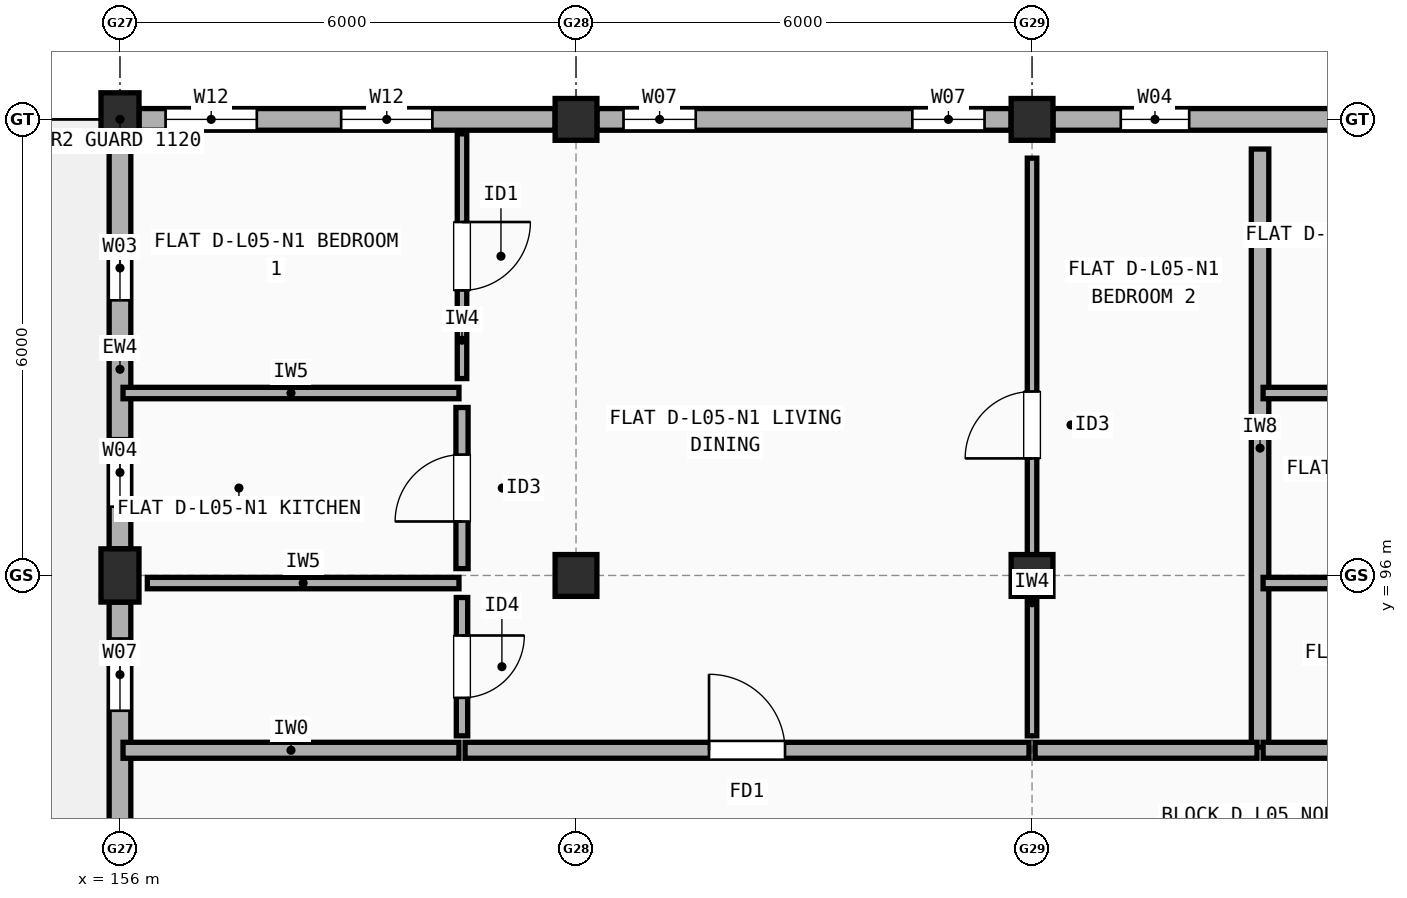
"""IFC4 building model, lengths in metres.
Left out: names, types, materials, properties, quantities, classifications, styles, units other than length and angle.
Written with IfcOpenShell. Run it as: python <this file> out.ifc"""

import sys

from ifc_helpers import new_model, si_unit, direction, frame, frame_2d, origin, origin_2d, place, context, subcontext, project, spatial, rectangle, extrude, element, fill, save


model = new_model("IFC4")
c1 = context("Model", 3, precision=1e-05, world=origin(), true_north=direction((0.0, 1.0)))
c2 = subcontext(c1, "Body", "Model", "MODEL_VIEW")
j1 = project(units=[si_unit("LENGTHUNIT", "METRE"), si_unit("PLANEANGLEUNIT", "RADIAN")], contexts=[c1])
p1 = place(None, origin())
s1 = spatial("IfcSite", under=j1, at=p1, CompositionType="ELEMENT")
p2 = place(p1, origin())
s2 = spatial("IfcBuilding", under=s1, at=p2, CompositionType="ELEMENT")
p3 = place(p2, frame((0.0, 0.0, 17.3)))
s3 = spatial("IfcBuildingStorey", under=s2, at=p3, CompositionType="ELEMENT", Elevation=17.3)
for number, where, z_axis, x_axis in (
    (1, (156.0, 96.0, 0.0), (0.0, 0.0, 1.0), (1.0, 0.0, 0.0)),
    (2, (156.0, 102.0, 0.0), (0.0, 0.0, 1.0), (1.0, 0.0, 0.0)),
):
    element("IfcColumn", number, at=place(p3, frame(where, z_axis=z_axis, x_axis=x_axis)), inside=s3, PredefinedType="COLUMN", context=c2, shape_type="SweptSolid", body=[
        extrude(rectangle(XDim=0.5, YDim=0.7, at=origin_2d()), origin(), (0.0, 0.0, 1.0), 2.965),
    ])
for number, where, z_axis, x_axis in (
    (3, (162.0, 96.0, 0.0), (0.0, 0.0, 1.0), (1.0, 0.0, 0.0)),
    (4, (162.0, 102.0, 0.0), (0.0, 0.0, 1.0), (1.0, 0.0, 0.0)),
    (5, (168.0, 96.0, 0.0), (0.0, 0.0, 1.0), (1.0, 0.0, 0.0)),
    (6, (168.0, 102.0, 0.0), (0.0, 0.0, 1.0), (1.0, 0.0, 0.0)),
):
    element("IfcColumn", number, at=place(p3, frame(where, z_axis=z_axis, x_axis=x_axis)), inside=s3, PredefinedType="COLUMN", context=c2, shape_type="SweptSolid", body=[
        extrude(rectangle(XDim=0.55, YDim=0.55, at=origin_2d()), origin(), (0.0, 0.0, 1.0), 2.965),
    ])
p4 = place(p3, frame((173.725, 102.0, 0.0), z_axis=(0.0, 0.0, 1.0), x_axis=(-1.0, 0.0, 0.0)))
e7 = element("IfcWall", 7, at=p4, inside=s3, PredefinedType="STANDARD", context=c2, shape_type="SweptSolid", body=[
    extrude(rectangle(XDim=5.45, YDim=0.285, at=frame_2d((2.725, 0.0))), origin(), (0.0, 0.0, 1.0), 2.447),
])
p5 = place(p4, frame((0.917, 0.0, 0.9)))
e8 = element("IfcOpeningElement", 8, at=p5, cuts=e7, PredefinedType="OPENING", context=c2, shape_type="SweptSolid", body=[
    extrude(rectangle(XDim=0.85, YDim=1.25, at=frame_2d((0.425, 0.625))), frame((0.0, 0.152, 0.0), z_axis=(0.0, -1.0, 0.0), x_axis=(1.0, 0.0, 0.0)), (0.0, 0.0, 1.0), 0.305),
])
p6 = place(p4, frame((3.657, 0.0, 0.9)))
e9 = element("IfcOpeningElement", 9, at=p6, cuts=e7, PredefinedType="OPENING", context=c2, shape_type="SweptSolid", body=[
    extrude(rectangle(XDim=0.9, YDim=1.3, at=frame_2d((0.45, 0.65))), frame((0.0, 0.152, 0.0), z_axis=(0.0, -1.0, 0.0), x_axis=(1.0, 0.0, 0.0)), (0.0, 0.0, 1.0), 0.305),
])
p7 = place(p3, frame((167.725, 102.0, 0.0), z_axis=(0.0, 0.0, 1.0), x_axis=(-1.0, 0.0, 0.0)))
e10 = element("IfcWall", 10, at=p7, inside=s3, PredefinedType="STANDARD", context=c2, shape_type="SweptSolid", body=[
    extrude(rectangle(XDim=5.45, YDim=0.285, at=frame_2d((2.725, 0.0))), origin(), (0.0, 0.0, 1.0), 2.447),
])
p8 = place(p7, frame((0.35, 0.0, 0.9)))
e11 = element("IfcOpeningElement", 11, at=p8, cuts=e10, PredefinedType="OPENING", context=c2, shape_type="SweptSolid", body=[
    extrude(rectangle(XDim=0.95, YDim=1.35, at=frame_2d((0.475, 0.675))), frame((0.0, 0.152, 0.0), z_axis=(0.0, -1.0, 0.0), x_axis=(1.0, 0.0, 0.0)), (0.0, 0.0, 1.0), 0.305),
])
p9 = place(p7, frame((4.15, 0.0, 0.9)))
e12 = element("IfcOpeningElement", 12, at=p9, cuts=e10, PredefinedType="OPENING", context=c2, shape_type="SweptSolid", body=[
    extrude(rectangle(XDim=0.95, YDim=1.35, at=frame_2d((0.475, 0.675))), frame((0.0, 0.152, 0.0), z_axis=(0.0, -1.0, 0.0), x_axis=(1.0, 0.0, 0.0)), (0.0, 0.0, 1.0), 0.305),
])
p10 = place(p3, frame((161.725, 102.0, 0.0), z_axis=(0.0, 0.0, 1.0), x_axis=(-1.0, 0.0, 0.0)))
e13 = element("IfcWall", 13, at=p10, inside=s3, PredefinedType="STANDARD", context=c2, shape_type="SweptSolid", body=[
    extrude(rectangle(XDim=5.475, YDim=0.285, at=frame_2d((2.738, 0.0))), origin(), (0.0, 0.0, 1.0), 2.447),
])
p11 = place(p10, frame((1.615, 0.0, 0.9)))
e14 = element("IfcOpeningElement", 14, at=p11, cuts=e13, PredefinedType="OPENING", context=c2, shape_type="SweptSolid", body=[
    extrude(rectangle(XDim=1.2, YDim=1.35, at=frame_2d((0.6, 0.675))), frame((0.0, 0.152, 0.0), z_axis=(0.0, -1.0, 0.0), x_axis=(1.0, 0.0, 0.0)), (0.0, 0.0, 1.0), 0.305),
])
p12 = place(p10, frame((3.925, 0.0, 0.9)))
e15 = element("IfcOpeningElement", 15, at=p12, cuts=e13, PredefinedType="OPENING", context=c2, shape_type="SweptSolid", body=[
    extrude(rectangle(XDim=1.2, YDim=1.35, at=frame_2d((0.6, 0.675))), frame((0.0, 0.152, 0.0), z_axis=(0.0, -1.0, 0.0), x_axis=(1.0, 0.0, 0.0)), (0.0, 0.0, 1.0), 0.305),
])
p13 = place(p3, frame((156.0, 101.65, 0.0), z_axis=(0.0, 0.0, 1.0), x_axis=(0.0, -1.0, 0.0)))
e16 = element("IfcWall", 16, at=p13, inside=s3, PredefinedType="STANDARD", context=c2, shape_type="SweptSolid", body=[
    extrude(rectangle(XDim=5.3, YDim=0.285, at=frame_2d((2.65, 0.0))), origin(), (0.0, 0.0, 1.0), 2.447),
])
p14 = place(p13, frame((1.18, 0.0, 0.9)))
e17 = element("IfcOpeningElement", 17, at=p14, cuts=e16, PredefinedType="OPENING", context=c2, shape_type="SweptSolid", body=[
    extrude(rectangle(XDim=0.85, YDim=1.25, at=frame_2d((0.425, 0.625))), frame((0.0, 0.152, 0.0), z_axis=(0.0, -1.0, 0.0), x_axis=(1.0, 0.0, 0.0)), (0.0, 0.0, 1.0), 0.305),
])
p15 = place(p13, frame((3.845, 0.0, 0.9)))
e18 = element("IfcOpeningElement", 18, at=p15, cuts=e16, PredefinedType="OPENING", context=c2, shape_type="SweptSolid", body=[
    extrude(rectangle(XDim=0.9, YDim=1.3, at=frame_2d((0.45, 0.65))), frame((0.0, 0.152, 0.0), z_axis=(0.0, -1.0, 0.0), x_axis=(1.0, 0.0, 0.0)), (0.0, 0.0, 1.0), 0.305),
])
p16 = place(p3, frame((156.0, 95.65, 0.0), z_axis=(0.0, 0.0, 1.0), x_axis=(0.0, -1.0, 0.0)))
e19 = element("IfcWall", 19, at=p16, inside=s3, PredefinedType="STANDARD", context=c2, shape_type="SweptSolid", body=[
    extrude(rectangle(XDim=5.3, YDim=0.285, at=frame_2d((2.65, 0.0))), origin(), (0.0, 0.0, 1.0), 2.447),
])
p17 = place(p16, frame((0.48, 0.0, 0.9)))
e20 = element("IfcOpeningElement", 20, at=p17, cuts=e19, PredefinedType="OPENING", context=c2, shape_type="SweptSolid", body=[
    extrude(rectangle(XDim=0.95, YDim=1.35, at=frame_2d((0.475, 0.675))), frame((0.0, 0.152, 0.0), z_axis=(0.0, -1.0, 0.0), x_axis=(1.0, 0.0, 0.0)), (0.0, 0.0, 1.0), 0.305),
])
p18 = place(p16, frame((3.12, 0.0, 0.9)))
e21 = element("IfcOpeningElement", 21, at=p18, cuts=e19, PredefinedType="OPENING", context=c2, shape_type="SweptSolid", body=[
    extrude(rectangle(XDim=1.05, YDim=1.35, at=frame_2d((0.525, 0.675))), frame((0.0, 0.152, 0.0), z_axis=(0.0, -1.0, 0.0), x_axis=(1.0, 0.0, 0.0)), (0.0, 0.0, 1.0), 0.305),
])
p19 = place(p3, frame((171.0, 93.74, 0.0), z_axis=(0.0, 0.0, 1.0), x_axis=(0.0, 1.0, 0.0)))
e22 = element("IfcWall", 22, at=p19, inside=s3, PredefinedType="SOLIDWALL", context=c2, shape_type="SweptSolid", body=[
    extrude(rectangle(XDim=7.87, YDim=0.23, at=frame_2d((3.935, 0.0))), origin(), (0.0, 0.0, 1.0), 2.508),
])
p20 = place(p3, frame((156.04, 93.7, 0.0), z_axis=(0.0, 0.0, 1.0), x_axis=(1.0, 0.0, 0.0)))
e23 = element("IfcWall", 23, at=p20, inside=s3, PredefinedType="SOLIDWALL", context=c2, shape_type="SweptSolid", body=[
    extrude(rectangle(XDim=4.42, YDim=0.21, at=frame_2d((2.21, 0.0))), origin(), (0.0, 0.0, 1.0), 2.447),
])
p21 = place(p3, frame((160.54, 93.7, 0.0), z_axis=(0.0, 0.0, 1.0), x_axis=(1.0, 0.0, 0.0)))
e24 = element("IfcWall", 24, at=p21, inside=s3, PredefinedType="SOLIDWALL", context=c2, shape_type="SweptSolid", body=[
    extrude(rectangle(XDim=7.42, YDim=0.21, at=frame_2d((3.71, 0.0))), origin(), (0.0, 0.0, 1.0), 2.508),
])
p22 = place(p21, frame((3.21, 0.0, 0.0)))
e25 = element("IfcOpeningElement", 25, at=p22, cuts=e24, PredefinedType="OPENING", context=c2, shape_type="SweptSolid", body=[
    extrude(rectangle(XDim=1.0, YDim=2.15, at=frame_2d((0.5, 1.075))), frame((0.0, 0.115, 0.0), z_axis=(0.0, -1.0, 0.0), x_axis=(1.0, 0.0, 0.0)), (0.0, 0.0, 1.0), 0.23),
])
p23 = place(p3, frame((160.5, 98.59, 0.0), z_axis=(0.0, 0.0, 1.0), x_axis=(0.0, 1.0, 0.0)))
e26 = element("IfcWall", 26, at=p23, inside=s3, PredefinedType="PARTITIONING", context=c2, shape_type="SweptSolid", body=[
    extrude(rectangle(XDim=3.22, YDim=0.125, at=frame_2d((1.61, 0.0))), origin(), (0.0, 0.0, 1.0), 2.965),
])
p24 = place(p23, frame((1.16, 0.0, 0.0)))
e27 = element("IfcOpeningElement", 27, at=p24, cuts=e26, PredefinedType="OPENING", context=c2, shape_type="SweptSolid", body=[
    extrude(rectangle(XDim=0.9, YDim=2.1, at=frame_2d((0.45, 1.05))), frame((0.0, 0.073, 0.0), z_axis=(0.0, -1.0, 0.0), x_axis=(1.0, 0.0, 0.0)), (0.0, 0.0, 1.0), 0.145),
])
p25 = place(p3, frame((160.5, 96.09, 0.0), z_axis=(0.0, 0.0, 1.0), x_axis=(0.0, 1.0, 0.0)))
e28 = element("IfcWall", 28, at=p25, inside=s3, PredefinedType="PLUMBINGWALL", context=c2, shape_type="SweptSolid", body=[
    extrude(rectangle(XDim=2.12, YDim=0.16, at=frame_2d((1.06, 0.0))), origin(), (0.0, 0.0, 1.0), 2.408),
])
p26 = place(p25, frame((0.62, 0.0, 0.0)))
e29 = element("IfcOpeningElement", 29, at=p26, cuts=e28, PredefinedType="OPENING", context=c2, shape_type="SweptSolid", body=[
    extrude(rectangle(XDim=0.88, YDim=2.1, at=frame_2d((0.44, 1.05))), frame((0.0, 0.09, 0.0), z_axis=(0.0, -1.0, 0.0), x_axis=(1.0, 0.0, 0.0)), (0.0, 0.0, 1.0), 0.18),
])
p27 = place(p3, frame((160.5, 93.89, 0.0), z_axis=(0.0, 0.0, 1.0), x_axis=(0.0, 1.0, 0.0)))
e30 = element("IfcWall", 30, at=p27, inside=s3, PredefinedType="PARTITIONING", context=c2, shape_type="SweptSolid", body=[
    extrude(rectangle(XDim=1.82, YDim=0.15, at=frame_2d((0.91, 0.0))), origin(), (0.0, 0.0, 1.0), 2.965),
])
p28 = place(p27, frame((0.5, 0.0, 0.0)))
e31 = element("IfcOpeningElement", 31, at=p28, cuts=e30, PredefinedType="OPENING", context=c2, shape_type="SweptSolid", body=[
    extrude(rectangle(XDim=0.82, YDim=2.08, at=frame_2d((0.41, 1.04))), frame((0.0, 0.085, 0.0), z_axis=(0.0, -1.0, 0.0), x_axis=(1.0, 0.0, 0.0)), (0.0, 0.0, 1.0), 0.17),
])
p29 = place(p3, frame((156.04, 98.4, 0.0), z_axis=(0.0, 0.0, 1.0), x_axis=(1.0, 0.0, 0.0)))
e32 = element("IfcWall", 32, at=p29, inside=s3, PredefinedType="PARTITIONING", context=c2, shape_type="SweptSolid", body=[
    extrude(rectangle(XDim=4.42, YDim=0.15, at=frame_2d((2.21, 0.0))), origin(), (0.0, 0.0, 1.0), 2.447),
])
p30 = place(p3, frame((156.36, 95.9, 0.0), z_axis=(0.0, 0.0, 1.0), x_axis=(1.0, 0.0, 0.0)))
e33 = element("IfcWall", 33, at=p30, inside=s3, PredefinedType="PARTITIONING", context=c2, shape_type="SweptSolid", body=[
    extrude(rectangle(XDim=4.1, YDim=0.15, at=frame_2d((2.05, 0.0))), origin(), (0.0, 0.0, 1.0), 2.408),
])
p31 = place(p3, frame((168.04, 93.7, 0.0), z_axis=(0.0, 0.0, 1.0), x_axis=(1.0, 0.0, 0.0)))
e34 = element("IfcWall", 34, at=p31, inside=s3, PredefinedType="SOLIDWALL", context=c2, shape_type="SweptSolid", body=[
    extrude(rectangle(XDim=2.92, YDim=0.21, at=frame_2d((1.46, 0.0))), origin(), (0.0, 0.0, 1.0), 2.508),
])
p32 = place(p3, frame((168.0, 93.89, 0.0), z_axis=(0.0, 0.0, 1.0), x_axis=(0.0, 1.0, 0.0)))
e35 = element("IfcWall", 35, at=p32, inside=s3, PredefinedType="PARTITIONING", context=c2, shape_type="SweptSolid", body=[
    extrude(rectangle(XDim=7.6, YDim=0.125, at=frame_2d((3.8, 0.0))), origin(), (0.0, 0.0, 1.0), 2.458),
])
p33 = place(p32, frame((3.65, 0.0, 0.0)))
e36 = element("IfcOpeningElement", 36, at=p33, cuts=e35, PredefinedType="OPENING", context=c2, shape_type="SweptSolid", body=[
    extrude(rectangle(XDim=0.88, YDim=2.1, at=frame_2d((0.44, 1.05))), frame((0.0, 0.073, 0.0), z_axis=(0.0, -1.0, 0.0), x_axis=(1.0, 0.0, 0.0)), (0.0, 0.0, 1.0), 0.145),
])
p34 = place(p3, frame((171.04, 93.7, 0.0), z_axis=(0.0, 0.0, 1.0), x_axis=(1.0, 0.0, 0.0)))
e37 = element("IfcWall", 37, at=p34, inside=s3, PredefinedType="SOLIDWALL", context=c2, shape_type="SweptSolid", body=[
    extrude(rectangle(XDim=4.42, YDim=0.21, at=frame_2d((2.21, 0.0))), origin(), (0.0, 0.0, 1.0), 2.965),
])
p35 = place(p3, frame((171.04, 98.4, 0.0), z_axis=(0.0, 0.0, 1.0), x_axis=(1.0, 0.0, 0.0)))
e38 = element("IfcWall", 38, at=p35, inside=s3, PredefinedType="PARTITIONING", context=c2, shape_type="SweptSolid", body=[
    extrude(rectangle(XDim=4.42, YDim=0.15, at=frame_2d((2.21, 0.0))), origin(), (0.0, 0.0, 1.0), 2.458),
])
p36 = place(p3, frame((171.04, 95.9, 0.0), z_axis=(0.0, 0.0, 1.0), x_axis=(1.0, 0.0, 0.0)))
e39 = element("IfcWall", 39, at=p36, inside=s3, PredefinedType="PARTITIONING", context=c2, shape_type="SweptSolid", body=[
    extrude(rectangle(XDim=4.42, YDim=0.15, at=frame_2d((2.21, 0.0))), origin(), (0.0, 0.0, 1.0), 2.408),
])
p37 = place(p6, origin())
e40 = element("IfcWindow", 40, at=p37, inside=s3, PartitioningType="SINGLE_PANEL", PredefinedType="WINDOW", context=c2, shape_type="SweptSolid", body=[
    extrude(rectangle(XDim=0.9, YDim=1.3, at=frame_2d((0.45, 0.65))), frame((0.0, 0.03, 0.0), z_axis=(0.0, -1.0, 0.0), x_axis=(1.0, 0.0, 0.0)), (0.0, 0.0, 1.0), 0.06),
])
fill(e9, e40)
p38 = place(p8, origin())
e41 = element("IfcWindow", 41, at=p38, inside=s3, PartitioningType="SINGLE_PANEL", PredefinedType="WINDOW", context=c2, shape_type="SweptSolid", body=[
    extrude(rectangle(XDim=0.95, YDim=1.35, at=frame_2d((0.475, 0.675))), frame((0.0, 0.03, 0.0), z_axis=(0.0, -1.0, 0.0), x_axis=(1.0, 0.0, 0.0)), (0.0, 0.0, 1.0), 0.06),
])
fill(e11, e41)
p39 = place(p9, origin())
e42 = element("IfcWindow", 42, at=p39, inside=s3, PartitioningType="SINGLE_PANEL", PredefinedType="WINDOW", context=c2, shape_type="SweptSolid", body=[
    extrude(rectangle(XDim=0.95, YDim=1.35, at=frame_2d((0.475, 0.675))), frame((0.0, 0.03, 0.0), z_axis=(0.0, -1.0, 0.0), x_axis=(1.0, 0.0, 0.0)), (0.0, 0.0, 1.0), 0.06),
])
fill(e12, e42)
p40 = place(p11, origin())
e43 = element("IfcWindow", 43, at=p40, inside=s3, PartitioningType="SINGLE_PANEL", PredefinedType="WINDOW", context=c2, shape_type="SweptSolid", body=[
    extrude(rectangle(XDim=1.2, YDim=1.35, at=frame_2d((0.6, 0.675))), frame((0.0, 0.03, 0.0), z_axis=(0.0, -1.0, 0.0), x_axis=(1.0, 0.0, 0.0)), (0.0, 0.0, 1.0), 0.06),
])
fill(e14, e43)
p41 = place(p12, origin())
e44 = element("IfcWindow", 44, at=p41, inside=s3, PartitioningType="SINGLE_PANEL", PredefinedType="WINDOW", context=c2, shape_type="SweptSolid", body=[
    extrude(rectangle(XDim=1.2, YDim=1.35, at=frame_2d((0.6, 0.675))), frame((0.0, 0.03, 0.0), z_axis=(0.0, -1.0, 0.0), x_axis=(1.0, 0.0, 0.0)), (0.0, 0.0, 1.0), 0.06),
])
fill(e15, e44)
p42 = place(p14, origin())
e45 = element("IfcWindow", 45, at=p42, inside=s3, PartitioningType="SINGLE_PANEL", PredefinedType="WINDOW", context=c2, shape_type="SweptSolid", body=[
    extrude(rectangle(XDim=0.85, YDim=1.25, at=frame_2d((0.425, 0.625))), frame((0.0, 0.03, 0.0), z_axis=(0.0, -1.0, 0.0), x_axis=(1.0, 0.0, 0.0)), (0.0, 0.0, 1.0), 0.06),
])
fill(e17, e45)
p43 = place(p15, origin())
e46 = element("IfcWindow", 46, at=p43, inside=s3, PartitioningType="SINGLE_PANEL", PredefinedType="WINDOW", context=c2, shape_type="SweptSolid", body=[
    extrude(rectangle(XDim=0.9, YDim=1.3, at=frame_2d((0.45, 0.65))), frame((0.0, 0.03, 0.0), z_axis=(0.0, -1.0, 0.0), x_axis=(1.0, 0.0, 0.0)), (0.0, 0.0, 1.0), 0.06),
])
fill(e18, e46)
p44 = place(p17, origin())
e47 = element("IfcWindow", 47, at=p44, inside=s3, PartitioningType="SINGLE_PANEL", PredefinedType="WINDOW", context=c2, shape_type="SweptSolid", body=[
    extrude(rectangle(XDim=0.95, YDim=1.35, at=frame_2d((0.475, 0.675))), frame((0.0, 0.03, 0.0), z_axis=(0.0, -1.0, 0.0), x_axis=(1.0, 0.0, 0.0)), (0.0, 0.0, 1.0), 0.06),
])
fill(e20, e47)
p45 = place(p22, origin())
e48 = element("IfcDoor", 48, at=p45, inside=s3, OperationType="SINGLE_SWING_LEFT", PredefinedType="DOOR", context=c2, shape_type="SweptSolid", body=[
    extrude(rectangle(XDim=1.0, YDim=2.15, at=frame_2d((0.5, 1.075))), frame((0.0, 0.025, 0.0), z_axis=(0.0, -1.0, 0.0), x_axis=(1.0, 0.0, 0.0)), (0.0, 0.0, 1.0), 0.05),
])
fill(e25, e48)
p46 = place(p24, origin())
e49 = element("IfcDoor", 49, at=p46, inside=s3, OperationType="SINGLE_SWING_RIGHT", PredefinedType="DOOR", context=c2, shape_type="SweptSolid", body=[
    extrude(rectangle(XDim=0.9, YDim=2.1, at=frame_2d((0.45, 1.05))), frame((0.0, 0.025, 0.0), z_axis=(0.0, -1.0, 0.0), x_axis=(1.0, 0.0, 0.0)), (0.0, 0.0, 1.0), 0.05),
])
fill(e27, e49)
p47 = place(p26, origin())
e50 = element("IfcDoor", 50, at=p47, inside=s3, OperationType="SINGLE_SWING_LEFT", PredefinedType="DOOR", context=c2, shape_type="SweptSolid", body=[
    extrude(rectangle(XDim=0.88, YDim=2.1, at=frame_2d((0.44, 1.05))), frame((0.0, 0.025, 0.0), z_axis=(0.0, -1.0, 0.0), x_axis=(1.0, 0.0, 0.0)), (0.0, 0.0, 1.0), 0.05),
])
fill(e29, e50)
p48 = place(p28, origin())
e51 = element("IfcDoor", 51, at=p48, inside=s3, OperationType="SINGLE_SWING_RIGHT", PredefinedType="DOOR", context=c2, shape_type="SweptSolid", body=[
    extrude(rectangle(XDim=0.82, YDim=2.08, at=frame_2d((0.41, 1.04))), frame((0.0, 0.025, 0.0), z_axis=(0.0, -1.0, 0.0), x_axis=(1.0, 0.0, 0.0)), (0.0, 0.0, 1.0), 0.05),
])
fill(e31, e51)
p49 = place(p33, origin())
e52 = element("IfcDoor", 52, at=p49, inside=s3, OperationType="SINGLE_SWING_LEFT", PredefinedType="DOOR", context=c2, shape_type="SweptSolid", body=[
    extrude(rectangle(XDim=0.88, YDim=2.1, at=frame_2d((0.44, 1.05))), frame((0.0, 0.025, 0.0), z_axis=(0.0, -1.0, 0.0), x_axis=(1.0, 0.0, 0.0)), (0.0, 0.0, 1.0), 0.05),
])
fill(e36, e52)
save(model, sys.argv[1])
